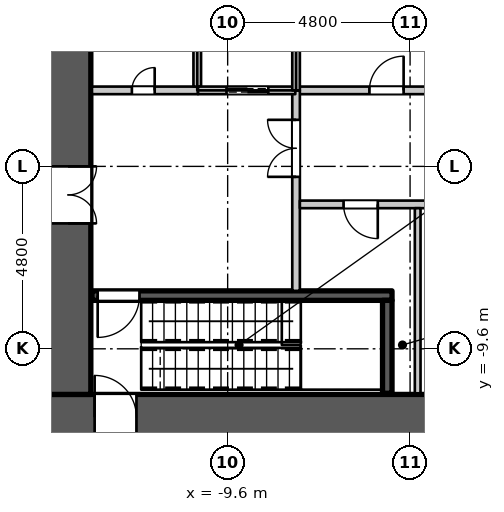
"""IFC4 building model, lengths in metres.
Left out: names, types, materials, properties, quantities, classifications, styles, units other than length and angle.
Written with IfcOpenShell. Run it as: python <this file> out.ifc"""

import sys

from ifc_helpers import new_model, si_unit, direction, frame, frame_2d, origin, place, context, subcontext, project, spatial, rectangle, extrude, element, fill, save


model = new_model("IFC4")
c1 = context("Model", 3, precision=1e-05, world=origin(), true_north=direction((0.0, 1.0)))
c2 = subcontext(c1, "Body", "Model", "MODEL_VIEW")
j1 = project(units=[si_unit("LENGTHUNIT", "METRE"), si_unit("PLANEANGLEUNIT", "RADIAN")], contexts=[c1])
p1 = place(None, origin())
s1 = spatial("IfcSite", under=j1, at=p1, CompositionType="ELEMENT")
p2 = place(p1, origin())
s2 = spatial("IfcBuilding", under=s1, at=p2, CompositionType="ELEMENT")
p3 = place(p2, frame((0.0, 0.0, 16.0)))
s3 = spatial("IfcBuildingStorey", under=s2, at=p3, CompositionType="ELEMENT", Elevation=16.0)
p4 = place(p3, frame((-14.4, -11.4, 0.0), z_axis=(0.0, 0.0, 1.0), x_axis=(1.0, 0.0, 0.0)))
e1 = element("IfcWall", 1, at=p4, inside=s3, PredefinedType="SHEAR", context=c2, shape_type="SweptSolid", body=[
    extrude(rectangle(XDim=28.8, YDim=1.2, at=frame_2d((14.4, 0.0))), origin(), (0.0, 0.0, 1.0), 5.0),
])
p5 = place(p4, frame((1.3, 0.0, 0.0)))
e2 = element("IfcOpeningElement", 2, at=p5, cuts=e1, PredefinedType="OPENING", context=c2, shape_type="SweptSolid", body=[
    extrude(rectangle(XDim=1.1, YDim=2.2, at=frame_2d((0.55, 1.1))), frame((0.0, 0.61, 0.0), z_axis=(0.0, -1.0, 0.0), x_axis=(1.0, 0.0, 0.0)), (0.0, 0.0, 1.0), 1.22),
])
p6 = place(p4, frame((26.4, 0.0, 0.0)))
e3 = element("IfcOpeningElement", 3, at=p6, cuts=e1, PredefinedType="OPENING", context=c2, shape_type="SweptSolid", body=[
    extrude(rectangle(XDim=1.1, YDim=2.2, at=frame_2d((0.55, 1.1))), frame((0.0, 0.61, 0.0), z_axis=(0.0, -1.0, 0.0), x_axis=(1.0, 0.0, 0.0)), (0.0, 0.0, 1.0), 1.22),
])
p7 = place(p3, frame((-13.8, -10.8, 0.0), z_axis=(0.0, 0.0, 1.0), x_axis=(0.0, 1.0, 0.0)))
e4 = element("IfcWall", 4, at=p7, inside=s3, PredefinedType="SHEAR", context=c2, shape_type="SweptSolid", body=[
    extrude(rectangle(XDim=21.6, YDim=1.2, at=frame_2d((10.8, 0.0))), origin(), (0.0, 0.0, 1.0), 5.0),
])
p8 = place(p7, frame((15.5, 0.0, 0.0)))
e5 = element("IfcOpeningElement", 5, at=p8, cuts=e4, PredefinedType="OPENING", context=c2, shape_type="SweptSolid", body=[
    extrude(rectangle(XDim=1.5, YDim=2.4, at=frame_2d((0.75, 1.2))), frame((0.0, 0.61, 0.0), z_axis=(0.0, -1.0, 0.0), x_axis=(1.0, 0.0, 0.0)), (0.0, 0.0, 1.0), 1.22),
])
p9 = place(p7, frame((4.5, 0.0, 0.0)))
e6 = element("IfcOpeningElement", 6, at=p9, cuts=e4, PredefinedType="OPENING", context=c2, shape_type="SweptSolid", body=[
    extrude(rectangle(XDim=1.5, YDim=2.4, at=frame_2d((0.75, 1.2))), frame((0.0, 0.61, 0.0), z_axis=(0.0, -1.0, 0.0), x_axis=(1.0, 0.0, 0.0)), (0.0, 0.0, 1.0), 1.22),
])
p10 = place(p3, frame((-7.82, -2.8, 0.0), z_axis=(0.0, 0.0, 1.0), x_axis=(1.0, 0.0, 0.0)))
e7 = element("IfcWall", 7, at=p10, inside=s3, PredefinedType="PARTITIONING", context=c2, shape_type="SweptSolid", body=[
    extrude(rectangle(XDim=9.84, YDim=0.2, at=frame_2d((4.92, 0.0))), origin(), (0.0, 0.0, 1.0), 4.4),
])
p11 = place(p10, frame((1.95, 0.0, 0.0)))
e8 = element("IfcOpeningElement", 8, at=p11, cuts=e7, PredefinedType="OPENING", context=c2, shape_type="SweptSolid", body=[
    extrude(rectangle(XDim=0.9, YDim=2.2, at=frame_2d((0.45, 1.1))), frame((0.0, 0.11, 0.0), z_axis=(0.0, -1.0, 0.0), x_axis=(1.0, 0.0, 0.0)), (0.0, 0.0, 1.0), 0.22),
])
p12 = place(p10, frame((6.7, 0.0, 0.0)))
e9 = element("IfcOpeningElement", 9, at=p12, cuts=e7, PredefinedType="OPENING", context=c2, shape_type="SweptSolid", body=[
    extrude(rectangle(XDim=0.9, YDim=2.2, at=frame_2d((0.45, 1.1))), frame((0.0, 0.11, 0.0), z_axis=(0.0, -1.0, 0.0), x_axis=(1.0, 0.0, 0.0)), (0.0, 0.0, 1.0), 0.22),
])
p13 = place(p3, frame((-7.8, -8.075, 0.0), z_axis=(0.0, 0.0, 1.0), x_axis=(0.0, 1.0, 0.0)))
e10 = element("IfcWall", 10, at=p13, inside=s3, PredefinedType="PARTITIONING", context=c2, shape_type="SweptSolid", body=[
    extrude(rectangle(XDim=5.275, YDim=0.2, at=frame_2d((2.637, 0.0))), origin(), (0.0, 0.0, 1.0), 4.4),
])
p14 = place(p13, frame((3.0, 0.0, 0.0)))
e11 = element("IfcOpeningElement", 11, at=p14, cuts=e10, PredefinedType="OPENING", context=c2, shape_type="SweptSolid", body=[
    extrude(rectangle(XDim=1.5, YDim=2.4, at=frame_2d((0.75, 1.2))), frame((0.0, 0.11, 0.0), z_axis=(0.0, -1.0, 0.0), x_axis=(1.0, 0.0, 0.0)), (0.0, 0.0, 1.0), 0.22),
])
p15 = place(p3, frame((-7.7, -5.8, 0.0), z_axis=(0.0, 0.0, 1.0), x_axis=(1.0, 0.0, 0.0)))
e12 = element("IfcWall", 12, at=p15, inside=s3, PredefinedType="PARTITIONING", context=c2, shape_type="SweptSolid", body=[
    extrude(rectangle(XDim=6.92, YDim=0.2, at=frame_2d((3.46, 0.0))), origin(), (0.0, 0.0, 1.0), 4.4),
])
p16 = place(p15, frame((1.15, 0.0, 0.0)))
e13 = element("IfcOpeningElement", 13, at=p16, cuts=e12, PredefinedType="OPENING", context=c2, shape_type="SweptSolid", body=[
    extrude(rectangle(XDim=0.9, YDim=2.2, at=frame_2d((0.45, 1.1))), frame((0.0, 0.11, 0.0), z_axis=(0.0, -1.0, 0.0), x_axis=(1.0, 0.0, 0.0)), (0.0, 0.0, 1.0), 0.22),
])
p17 = place(p15, frame((4.5, 0.0, 0.0)))
e14 = element("IfcOpeningElement", 14, at=p17, cuts=e12, PredefinedType="OPENING", context=c2, shape_type="SweptSolid", body=[
    extrude(rectangle(XDim=0.9, YDim=2.2, at=frame_2d((0.45, 1.1))), frame((0.0, 0.11, 0.0), z_axis=(0.0, -1.0, 0.0), x_axis=(1.0, 0.0, 0.0)), (0.0, 0.0, 1.0), 0.22),
])
p18 = place(p3, frame((-4.6, -10.77, 0.0), z_axis=(0.0, 0.0, 1.0), x_axis=(0.0, 1.0, 0.0)))
e15 = element("IfcWall", 15, at=p18, inside=s3, PredefinedType="PARTITIONING", context=c2, shape_type="SweptSolid", body=[
    extrude(rectangle(XDim=4.87, YDim=0.15, at=frame_2d((2.435, 0.0))), origin(), (0.0, 0.0, 1.0), 4.4),
])
p19 = place(p3, frame((-13.17, -2.8, 0.0), z_axis=(0.0, 0.0, 1.0), x_axis=(1.0, 0.0, 0.0)))
e16 = element("IfcWall", 16, at=p19, inside=s3, PredefinedType="PARTITIONING", context=c2, shape_type="SweptSolid", body=[
    extrude(rectangle(XDim=2.79, YDim=0.2, at=frame_2d((1.395, 0.0))), origin(), (0.0, 0.0, 1.0), 4.4),
])
p20 = place(p19, frame((1.05, 0.0, 0.0)))
e17 = element("IfcOpeningElement", 17, at=p20, cuts=e16, PredefinedType="OPENING", context=c2, shape_type="SweptSolid", body=[
    extrude(rectangle(XDim=0.6, YDim=2.0, at=frame_2d((0.3, 1.0))), frame((0.0, 0.11, 0.0), z_axis=(0.0, -1.0, 0.0), x_axis=(1.0, 0.0, 0.0)), (0.0, 0.0, 1.0), 0.22),
])
p21 = place(p3, frame((-10.4, -2.7, 0.0), z_axis=(0.0, 0.0, 1.0), x_axis=(0.0, 1.0, 0.0)))
e18 = element("IfcWall", 18, at=p21, inside=s3, PredefinedType="PARTITIONING", context=c2, shape_type="SweptSolid", body=[
    extrude(rectangle(XDim=2.7, YDim=0.2, at=frame_2d((1.35, 0.0))), origin(), (0.0, 0.0, 1.0), 4.4),
])
p22 = place(p3, frame((-10.38, -2.8, 0.0), z_axis=(0.0, 0.0, 1.0), x_axis=(1.0, 0.0, 0.0)))
e19 = element("IfcWall", 19, at=p22, inside=s3, PredefinedType="PARTITIONING", context=c2, shape_type="SweptSolid", body=[
    extrude(rectangle(XDim=2.56, YDim=0.2, at=frame_2d((1.28, 0.0))), origin(), (0.0, 0.0, 1.0), 4.4),
])
p23 = place(p22, frame((0.75, 0.0, 0.0)))
e20 = element("IfcOpeningElement", 20, at=p23, cuts=e19, PredefinedType="OPENING", context=c2, shape_type="SweptSolid", body=[
    extrude(rectangle(XDim=1.1, YDim=2.2, at=frame_2d((0.55, 1.1))), frame((0.0, 0.11, 0.0), z_axis=(0.0, -1.0, 0.0), x_axis=(1.0, 0.0, 0.0)), (0.0, 0.0, 1.0), 0.22),
])
p24 = place(p3, frame((-7.8, -2.8, 0.0), z_axis=(0.0, 0.0, 1.0), x_axis=(0.0, 1.0, 0.0)))
e21 = element("IfcWall", 21, at=p24, inside=s3, PredefinedType="PARTITIONING", context=c2, shape_type="SweptSolid", body=[
    extrude(rectangle(XDim=2.8, YDim=0.2, at=frame_2d((1.4, 0.0))), origin(), (0.0, 0.0, 1.0), 4.4),
])
p25 = place(p3, frame((-13.17, -8.2, 0.0), z_axis=(0.0, 0.0, 1.0), x_axis=(1.0, 0.0, 0.0)))
e22 = element("IfcWall", 22, at=p25, inside=s3, PredefinedType="SHEAR", context=c2, shape_type="SweptSolid", body=[
    extrude(rectangle(XDim=7.895, YDim=0.25, at=frame_2d((3.948, 0.0))), origin(), (0.0, 0.0, 1.0), 4.65),
])
p26 = place(p25, frame((0.15, 0.0, 0.0)))
e23 = element("IfcOpeningElement", 23, at=p26, cuts=e22, PredefinedType="OPENING", context=c2, shape_type="SweptSolid", body=[
    extrude(rectangle(XDim=1.1, YDim=2.2, at=frame_2d((0.55, 1.1))), frame((0.0, 0.135, 0.0), z_axis=(0.0, -1.0, 0.0), x_axis=(1.0, 0.0, 0.0)), (0.0, 0.0, 1.0), 0.27),
])
p27 = place(p3, frame((-5.4, -10.77, 0.0), z_axis=(0.0, 0.0, 1.0), x_axis=(0.0, 1.0, 0.0)))
e24 = element("IfcWall", 24, at=p27, inside=s3, PredefinedType="SHEAR", context=c2, shape_type="SweptSolid", body=[
    extrude(rectangle(XDim=2.445, YDim=0.25, at=frame_2d((1.223, 0.0))), origin(), (0.0, 0.0, 1.0), 4.65),
])
p28 = place(p20, origin())
e25 = element("IfcDoor", 25, at=p28, inside=s3, OperationType="SINGLE_SWING_RIGHT", PredefinedType="DOOR", context=c2, shape_type="SweptSolid", body=[
    extrude(rectangle(XDim=0.6, YDim=2.0, at=frame_2d((0.3, 1.0))), frame((0.0, 0.025, 0.0), z_axis=(0.0, -1.0, 0.0), x_axis=(1.0, 0.0, 0.0)), (0.0, 0.0, 1.0), 0.05),
])
fill(e17, e25)
p29 = place(p16, origin())
e26 = element("IfcDoor", 26, at=p29, inside=s3, OperationType="SINGLE_SWING_LEFT", PredefinedType="DOOR", context=c2, shape_type="SweptSolid", body=[
    extrude(rectangle(XDim=0.9, YDim=2.2, at=frame_2d((0.45, 1.1))), frame((0.0, 0.025, 0.0), z_axis=(0.0, -1.0, 0.0), x_axis=(1.0, 0.0, 0.0)), (0.0, 0.0, 1.0), 0.05),
])
fill(e13, e26)
p30 = place(p11, origin())
e27 = element("IfcDoor", 27, at=p30, inside=s3, OperationType="SINGLE_SWING_RIGHT", PredefinedType="DOOR", context=c2, shape_type="SweptSolid", body=[
    extrude(rectangle(XDim=0.9, YDim=2.2, at=frame_2d((0.45, 1.1))), frame((0.0, 0.025, 0.0), z_axis=(0.0, -1.0, 0.0), x_axis=(1.0, 0.0, 0.0)), (0.0, 0.0, 1.0), 0.05),
])
fill(e8, e27)
p31 = place(p23, origin())
e28 = element("IfcDoor", 28, at=p31, inside=s3, OperationType="DOUBLE_DOOR_SLIDING", PredefinedType="DOOR", context=c2, shape_type="SweptSolid", body=[
    extrude(rectangle(XDim=1.1, YDim=2.2, at=frame_2d((0.55, 1.1))), frame((0.0, 0.025, 0.0), z_axis=(0.0, -1.0, 0.0), x_axis=(1.0, 0.0, 0.0)), (0.0, 0.0, 1.0), 0.05),
])
fill(e20, e28)
p32 = place(p26, origin())
e29 = element("IfcDoor", 29, at=p32, inside=s3, OperationType="SINGLE_SWING_RIGHT", PredefinedType="DOOR", context=c2, shape_type="SweptSolid", body=[
    extrude(rectangle(XDim=1.1, YDim=2.2, at=frame_2d((0.55, 1.1))), frame((0.0, 0.025, 0.0), z_axis=(0.0, -1.0, 0.0), x_axis=(1.0, 0.0, 0.0)), (0.0, 0.0, 1.0), 0.05),
])
fill(e23, e29)
p33 = place(p14, origin())
e30 = element("IfcDoor", 30, at=p33, inside=s3, OperationType="DOUBLE_DOOR_SINGLE_SWING", PredefinedType="DOOR", context=c2, shape_type="SweptSolid", body=[
    extrude(rectangle(XDim=1.5, YDim=2.4, at=frame_2d((0.75, 1.2))), frame((0.0, 0.025, 0.0), z_axis=(0.0, -1.0, 0.0), x_axis=(1.0, 0.0, 0.0)), (0.0, 0.0, 1.0), 0.05),
])
fill(e11, e30)
p34 = place(p9, origin())
e31 = element("IfcDoor", 31, at=p34, inside=s3, OperationType="DOUBLE_DOOR_SINGLE_SWING", PredefinedType="DOOR", context=c2, shape_type="SweptSolid", body=[
    extrude(rectangle(XDim=1.5, YDim=2.4, at=frame_2d((0.75, 1.2))), frame((0.0, 0.025, 0.0), z_axis=(0.0, -1.0, 0.0), x_axis=(1.0, 0.0, 0.0)), (0.0, 0.0, 1.0), 0.05),
])
fill(e6, e31)
p35 = place(p5, origin())
e32 = element("IfcDoor", 32, at=p35, inside=s3, OperationType="SINGLE_SWING_LEFT", PredefinedType="DOOR", context=c2, shape_type="SweptSolid", body=[
    extrude(rectangle(XDim=1.1, YDim=2.2, at=frame_2d((0.55, 1.1))), frame((0.0, 0.025, 0.0), z_axis=(0.0, -1.0, 0.0), x_axis=(1.0, 0.0, 0.0)), (0.0, 0.0, 1.0), 0.05),
])
fill(e2, e32)
save(model, sys.argv[1])
